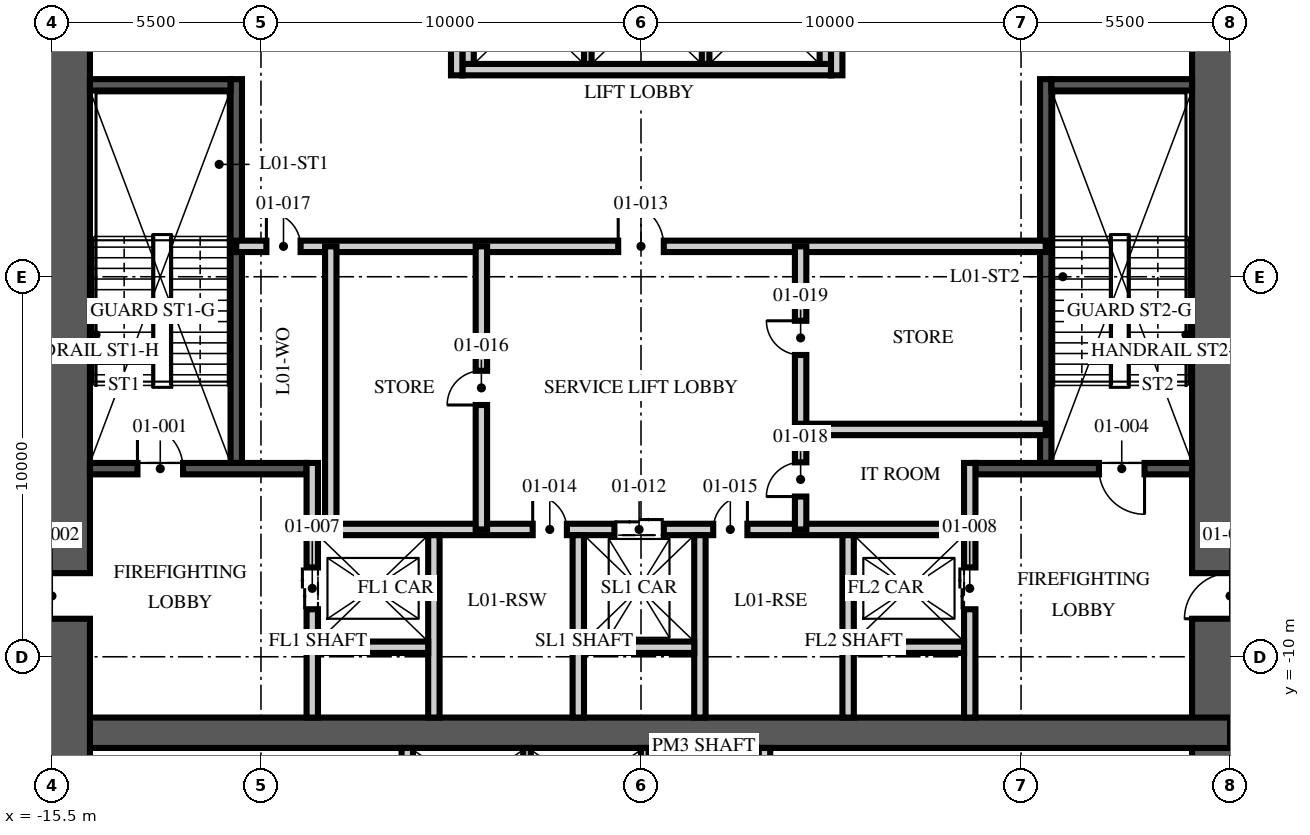
"""IFC4 building model, lengths in metres.
Left out: names, types, materials, properties, quantities, classifications, styles, units other than length and angle.
Written with IfcOpenShell. Run it as: python <this file> out.ifc"""

import sys

from ifc_helpers import new_model, si_unit, direction, frame, frame_2d, origin, place, context, subcontext, project, spatial, rectangle, extrude, element, fill, save


model = new_model("IFC4")
c1 = context("Model", 3, precision=1e-05, world=origin(), true_north=direction((0.0, 1.0)))
c2 = subcontext(c1, "Body", "Model", "MODEL_VIEW")
j1 = project(units=[si_unit("LENGTHUNIT", "METRE"), si_unit("PLANEANGLEUNIT", "RADIAN")], contexts=[c1])
p1 = place(None, origin())
s1 = spatial("IfcSite", under=j1, at=p1, CompositionType="ELEMENT")
p2 = place(p1, origin())
s2 = spatial("IfcBuilding", under=s1, at=p2, CompositionType="ELEMENT")
p3 = place(p2, frame((0.0, 0.0, 6.0)))
s3 = spatial("IfcBuildingStorey", under=s2, at=p3, CompositionType="ELEMENT", Elevation=6.0)
p4 = place(p3, frame((15.5, -15.5, -0.3), z_axis=(0.0, 0.0, 1.0), x_axis=(0.0, 1.0, 0.0)))
e1 = element("IfcWall", 1, at=p4, inside=s3, PredefinedType="SHEAR", context=c2, shape_type="SweptSolid", body=[
    extrude(rectangle(XDim=31.0, YDim=2.0, at=frame_2d((15.5, 0.0))), origin(), (0.0, 0.0, 1.0), 5.0),
])
p5 = place(p4, frame((6.5, 0.0, 0.3)))
e2 = element("IfcOpeningElement", 2, at=p5, cuts=e1, PredefinedType="OPENING", context=c2, shape_type="SweptSolid", body=[
    extrude(rectangle(XDim=1.2, YDim=2.1, at=frame_2d((0.6, 1.05))), frame((0.0, 1.01, 0.0), z_axis=(0.0, -1.0, 0.0), x_axis=(1.0, 0.0, 0.0)), (0.0, 0.0, 1.0), 2.02),
])
p6 = place(p4, frame((23.0, 0.0, 0.3)))
e3 = element("IfcOpeningElement", 3, at=p6, cuts=e1, PredefinedType="OPENING", context=c2, shape_type="SweptSolid", body=[
    extrude(rectangle(XDim=1.8, YDim=2.1, at=frame_2d((0.9, 1.05))), frame((0.0, 1.01, 0.0), z_axis=(0.0, -1.0, 0.0), x_axis=(1.0, 0.0, 0.0)), (0.0, 0.0, 1.0), 2.02),
])
p7 = place(p3, frame((-15.5, -12.0, -0.3), z_axis=(0.0, 0.0, 1.0), x_axis=(1.0, 0.0, 0.0)))
e4 = element("IfcWall", 4, at=p7, inside=s3, PredefinedType="SHEAR", context=c2, shape_type="SweptSolid", body=[
    extrude(rectangle(XDim=31.0, YDim=0.8, at=frame_2d((15.5, 0.0))), origin(), (0.0, 0.0, 1.0), 5.0),
])
p8 = place(p3, frame((-15.5, -15.5, -0.3), z_axis=(0.0, 0.0, 1.0), x_axis=(0.0, 1.0, 0.0)))
e5 = element("IfcWall", 5, at=p8, inside=s3, PredefinedType="SHEAR", context=c2, shape_type="SweptSolid", body=[
    extrude(rectangle(XDim=31.0, YDim=2.0, at=frame_2d((15.5, 0.0))), origin(), (0.0, 0.0, 1.0), 5.0),
])
p9 = place(p8, frame((6.5, 0.0, 0.3)))
e6 = element("IfcOpeningElement", 6, at=p9, cuts=e5, PredefinedType="OPENING", context=c2, shape_type="SweptSolid", body=[
    extrude(rectangle(XDim=1.2, YDim=2.1, at=frame_2d((0.6, 1.05))), frame((0.0, 1.01, 0.0), z_axis=(0.0, -1.0, 0.0), x_axis=(1.0, 0.0, 0.0)), (0.0, 0.0, 1.0), 2.02),
])
p10 = place(p8, frame((23.0, 0.0, 0.3)))
e7 = element("IfcOpeningElement", 7, at=p10, cuts=e5, PredefinedType="OPENING", context=c2, shape_type="SweptSolid", body=[
    extrude(rectangle(XDim=1.8, YDim=2.1, at=frame_2d((0.9, 1.05))), frame((0.0, 1.01, 0.0), z_axis=(0.0, -1.0, 0.0), x_axis=(1.0, 0.0, 0.0)), (0.0, 0.0, 1.0), 2.02),
])
p11 = place(p3, frame((-10.65, -4.9, 0.0), z_axis=(0.0, 0.0, 1.0), x_axis=(0.0, 1.0, 0.0)))
e8 = element("IfcWall", 8, at=p11, inside=s3, PredefinedType="SOLIDWALL", context=c2, shape_type="SweptSolid", body=[
    extrude(rectangle(XDim=10.1, YDim=0.3, at=frame_2d((5.05, 0.0))), origin(), (0.0, 0.0, 1.0), 4.7),
])
p12 = place(p3, frame((-14.5, -5.05, 0.0), z_axis=(0.0, 0.0, 1.0), x_axis=(1.0, 0.0, 0.0)))
e9 = element("IfcWall", 9, at=p12, inside=s3, PredefinedType="SOLIDWALL", context=c2, shape_type="SweptSolid", body=[
    extrude(rectangle(XDim=5.7, YDim=0.3, at=frame_2d((2.85, 0.0))), origin(), (0.0, 0.0, 1.0), 4.7),
])
p13 = place(p12, frame((1.25, 0.0, 0.0)))
e10 = element("IfcOpeningElement", 10, at=p13, cuts=e9, PredefinedType="OPENING", context=c2, shape_type="SweptSolid", body=[
    extrude(rectangle(XDim=1.2, YDim=2.1, at=frame_2d((0.6, 1.05))), frame((0.0, 0.16, 0.0), z_axis=(0.0, -1.0, 0.0), x_axis=(1.0, 0.0, 0.0)), (0.0, 0.0, 1.0), 0.32),
])
p14 = place(p3, frame((-14.5, 5.05, 0.0), z_axis=(0.0, 0.0, 1.0), x_axis=(1.0, 0.0, 0.0)))
e11 = element("IfcWall", 11, at=p14, inside=s3, PredefinedType="SOLIDWALL", context=c2, shape_type="SweptSolid", body=[
    extrude(rectangle(XDim=3.7, YDim=0.3, at=frame_2d((1.85, 0.0))), origin(), (0.0, 0.0, 1.0), 4.7),
])
p15 = place(p3, frame((-8.65, -11.6, 0.0), z_axis=(0.0, 0.0, 1.0), x_axis=(0.0, 1.0, 0.0)))
e12 = element("IfcWall", 12, at=p15, inside=s3, PredefinedType="PARTITIONING", context=c2, shape_type="SweptSolid", body=[
    extrude(rectangle(XDim=6.7, YDim=0.3, at=frame_2d((3.35, 0.0))), origin(), (0.0, 0.0, 1.0), 4.7),
])
p16 = place(p15, frame((2.85, 0.0, 0.0)))
e13 = element("IfcOpeningElement", 13, at=p16, cuts=e12, PredefinedType="OPENING", context=c2, shape_type="SweptSolid", body=[
    extrude(rectangle(XDim=1.1, YDim=2.1, at=frame_2d((0.55, 1.05))), frame((0.0, 0.16, 0.0), z_axis=(0.0, -1.0, 0.0), x_axis=(1.0, 0.0, 0.0)), (0.0, 0.0, 1.0), 0.32),
])
p17 = place(p3, frame((10.65, -4.9, 0.0), z_axis=(0.0, 0.0, 1.0), x_axis=(0.0, 1.0, 0.0)))
e14 = element("IfcWall", 14, at=p17, inside=s3, PredefinedType="SOLIDWALL", context=c2, shape_type="SweptSolid", body=[
    extrude(rectangle(XDim=10.1, YDim=0.3, at=frame_2d((5.05, 0.0))), origin(), (0.0, 0.0, 1.0), 4.7),
])
p18 = place(p3, frame((14.5, -5.05, 0.0), z_axis=(0.0, 0.0, 1.0), x_axis=(-1.0, 0.0, 0.0)))
e15 = element("IfcWall", 15, at=p18, inside=s3, PredefinedType="SOLIDWALL", context=c2, shape_type="SweptSolid", body=[
    extrude(rectangle(XDim=5.7, YDim=0.3, at=frame_2d((2.85, 0.0))), origin(), (0.0, 0.0, 1.0), 4.7),
])
p19 = place(p18, frame((1.25, 0.0, 0.0)))
e16 = element("IfcOpeningElement", 16, at=p19, cuts=e15, PredefinedType="OPENING", context=c2, shape_type="SweptSolid", body=[
    extrude(rectangle(XDim=1.2, YDim=2.1, at=frame_2d((0.6, 1.05))), frame((0.0, 0.16, 0.0), z_axis=(0.0, -1.0, 0.0), x_axis=(1.0, 0.0, 0.0)), (0.0, 0.0, 1.0), 0.32),
])
p20 = place(p3, frame((14.5, 5.05, 0.0), z_axis=(0.0, 0.0, 1.0), x_axis=(-1.0, 0.0, 0.0)))
e17 = element("IfcWall", 17, at=p20, inside=s3, PredefinedType="SOLIDWALL", context=c2, shape_type="SweptSolid", body=[
    extrude(rectangle(XDim=3.7, YDim=0.3, at=frame_2d((1.85, 0.0))), origin(), (0.0, 0.0, 1.0), 4.7),
])
p21 = place(p3, frame((8.65, -11.6, 0.0), z_axis=(0.0, 0.0, 1.0), x_axis=(0.0, 1.0, 0.0)))
e18 = element("IfcWall", 18, at=p21, inside=s3, PredefinedType="PARTITIONING", context=c2, shape_type="SweptSolid", body=[
    extrude(rectangle(XDim=6.7, YDim=0.3, at=frame_2d((3.35, 0.0))), origin(), (0.0, 0.0, 1.0), 4.7),
])
p22 = place(p21, frame((2.85, 0.0, 0.0)))
e19 = element("IfcOpeningElement", 19, at=p22, cuts=e18, PredefinedType="OPENING", context=c2, shape_type="SweptSolid", body=[
    extrude(rectangle(XDim=1.1, YDim=2.1, at=frame_2d((0.55, 1.05))), frame((0.0, 0.16, 0.0), z_axis=(0.0, -1.0, 0.0), x_axis=(1.0, 0.0, 0.0)), (0.0, 0.0, 1.0), 0.32),
])
p23 = place(p3, frame((-8.5, -6.65, 0.0), z_axis=(0.0, 0.0, 1.0), x_axis=(1.0, 0.0, 0.0)))
e20 = element("IfcWall", 20, at=p23, inside=s3, PredefinedType="PARTITIONING", context=c2, shape_type="SweptSolid", body=[
    extrude(rectangle(XDim=17.0, YDim=0.3, at=frame_2d((8.5, 0.0))), origin(), (0.0, 0.0, 1.0), 4.7),
])
p24 = place(p23, frame((7.8, 0.0, 0.0)))
e21 = element("IfcOpeningElement", 21, at=p24, cuts=e20, PredefinedType="OPENING", context=c2, shape_type="SweptSolid", body=[
    extrude(rectangle(XDim=1.3, YDim=2.4, at=frame_2d((0.65, 1.2))), frame((0.0, 0.16, 0.0), z_axis=(0.0, -1.0, 0.0), x_axis=(1.0, 0.0, 0.0)), (0.0, 0.0, 1.0), 0.32),
])
p25 = place(p23, frame((5.65, 0.0, 0.0)))
e22 = element("IfcOpeningElement", 22, at=p25, cuts=e20, PredefinedType="OPENING", context=c2, shape_type="SweptSolid", body=[
    extrude(rectangle(XDim=0.9, YDim=2.1, at=frame_2d((0.45, 1.05))), frame((0.0, 0.16, 0.0), z_axis=(0.0, -1.0, 0.0), x_axis=(1.0, 0.0, 0.0)), (0.0, 0.0, 1.0), 0.32),
])
p26 = place(p23, frame((10.4, 0.0, 0.0)))
e23 = element("IfcOpeningElement", 23, at=p26, cuts=e20, PredefinedType="OPENING", context=c2, shape_type="SweptSolid", body=[
    extrude(rectangle(XDim=0.9, YDim=2.1, at=frame_2d((0.45, 1.05))), frame((0.0, 0.16, 0.0), z_axis=(0.0, -1.0, 0.0), x_axis=(1.0, 0.0, 0.0)), (0.0, 0.0, 1.0), 0.32),
])
for number, where, z_axis, x_axis in (
    (24, (-5.45, -11.6, 0.0), (0.0, 0.0, 1.0), (0.0, 1.0, 0.0)),
    (25, (-1.65, -11.6, 0.0), (0.0, 0.0, 1.0), (0.0, 1.0, 0.0)),
    (26, (1.55, -11.6, 0.0), (0.0, 0.0, 1.0), (0.0, 1.0, 0.0)),
    (27, (5.45, -11.6, 0.0), (0.0, 0.0, 1.0), (0.0, 1.0, 0.0)),
):
    element("IfcWall", number, at=place(p3, frame(where, z_axis=z_axis, x_axis=x_axis)), inside=s3, PredefinedType="PARTITIONING", context=c2, shape_type="SweptSolid", body=[
        extrude(rectangle(XDim=4.8, YDim=0.3, at=frame_2d((2.4, 0.0))), origin(), (0.0, 0.0, 1.0), 4.7),
    ])
for number, where, z_axis, x_axis in (
    (28, (-8.5, -9.75, 0.0), (0.0, 0.0, 1.0), (1.0, 0.0, 0.0)),
    (29, (-1.5, -9.75, 0.0), (0.0, 0.0, 1.0), (1.0, 0.0, 0.0)),
    (30, (5.6, -9.75, 0.0), (0.0, 0.0, 1.0), (1.0, 0.0, 0.0)),
):
    element("IfcWall", number, at=place(p3, frame(where, z_axis=z_axis, x_axis=x_axis)), inside=s3, PredefinedType="PARTITIONING", context=c2, shape_type="SweptSolid", body=[
        extrude(rectangle(XDim=2.9, YDim=0.3, at=frame_2d((1.45, 0.0))), origin(), (0.0, 0.0, 1.0), 4.7),
    ])
p27 = place(p3, frame((-4.7, 5.45, 0.0), z_axis=(0.0, 0.0, 1.0), x_axis=(1.0, 0.0, 0.0)))
e31 = element("IfcWall", 31, at=p27, inside=s3, PredefinedType="PARTITIONING", context=c2, shape_type="SweptSolid", body=[
    extrude(rectangle(XDim=9.7, YDim=0.3, at=frame_2d((4.85, 0.0))), origin(), (0.0, 0.0, 1.0), 4.7),
])
for number, where, z_axis, x_axis in (
    (32, (-4.55, 5.6, 0.0), (0.0, 0.0, 1.0), (0.0, 1.0, 0.0)),
    (33, (4.85, 5.6, 0.0), (0.0, 0.0, 1.0), (0.0, 1.0, 0.0)),
):
    element("IfcWall", number, at=place(p3, frame(where, z_axis=z_axis, x_axis=x_axis)), inside=s3, PredefinedType="PARTITIONING", context=c2, shape_type="SweptSolid", body=[
        extrude(rectangle(XDim=2.8, YDim=0.3, at=frame_2d((1.4, 0.0))), origin(), (0.0, 0.0, 1.0), 4.7),
    ])
for number, where, z_axis, x_axis in (
    (34, (-1.4, 5.6, 0.0), (0.0, 0.0, 1.0), (0.0, 1.0, 0.0)),
    (35, (1.7, 5.6, 0.0), (0.0, 0.0, 1.0), (0.0, 1.0, 0.0)),
):
    element("IfcWall", number, at=place(p3, frame(where, z_axis=z_axis, x_axis=x_axis)), inside=s3, PredefinedType="PARTITIONING", context=c2, shape_type="SweptSolid", body=[
        extrude(rectangle(XDim=2.8, YDim=0.2, at=frame_2d((1.4, 0.0))), origin(), (0.0, 0.0, 1.0), 4.7),
    ])
for number, where, z_axis, x_axis in (
    (36, (-6.15, -14.5, 0.0), (0.0, 0.0, 1.0), (0.0, 1.0, 0.0)),
    (37, (3.25, -14.5, 0.0), (0.0, 0.0, 1.0), (0.0, 1.0, 0.0)),
):
    element("IfcWall", number, at=place(p3, frame(where, z_axis=z_axis, x_axis=x_axis)), inside=s3, PredefinedType="PARTITIONING", context=c2, shape_type="SweptSolid", body=[
        extrude(rectangle(XDim=2.1, YDim=0.3, at=frame_2d((1.05, 0.0))), origin(), (0.0, 0.0, 1.0), 4.7),
    ])
for number, where, z_axis, x_axis in (
    (38, (-3.0, -14.5, 0.0), (0.0, 0.0, 1.0), (0.0, 1.0, 0.0)),
    (39, (0.1, -14.5, 0.0), (0.0, 0.0, 1.0), (0.0, 1.0, 0.0)),
):
    element("IfcWall", number, at=place(p3, frame(where, z_axis=z_axis, x_axis=x_axis)), inside=s3, PredefinedType="PARTITIONING", context=c2, shape_type="SweptSolid", body=[
        extrude(rectangle(XDim=2.1, YDim=0.2, at=frame_2d((1.05, 0.0))), origin(), (0.0, 0.0, 1.0), 4.7),
    ])
p28 = place(p3, frame((-10.65, 0.8, 0.0), z_axis=(0.0, 0.0, 1.0), x_axis=(1.0, 0.0, 0.0)))
e40 = element("IfcWall", 40, at=p28, inside=s3, PredefinedType="PARTITIONING", context=c2, shape_type="SweptSolid", body=[
    extrude(rectangle(XDim=21.3, YDim=0.3, at=frame_2d((10.65, 0.0))), origin(), (0.0, 0.0, 1.0), 4.7),
])
p29 = place(p28, frame((10.05, 0.0, 0.0)))
e41 = element("IfcOpeningElement", 41, at=p29, cuts=e40, PredefinedType="OPENING", context=c2, shape_type="SweptSolid", body=[
    extrude(rectangle(XDim=1.2, YDim=2.1, at=frame_2d((0.6, 1.05))), frame((0.0, 0.16, 0.0), z_axis=(0.0, -1.0, 0.0), x_axis=(1.0, 0.0, 0.0)), (0.0, 0.0, 1.0), 0.32),
])
p30 = place(p28, frame((0.793, 0.0, 0.0)))
e42 = element("IfcOpeningElement", 42, at=p30, cuts=e40, PredefinedType="OPENING", context=c2, shape_type="SweptSolid", body=[
    extrude(rectangle(XDim=0.9, YDim=2.1, at=frame_2d((0.45, 1.05))), frame((0.0, 0.16, 0.0), z_axis=(0.0, -1.0, 0.0), x_axis=(1.0, 0.0, 0.0)), (0.0, 0.0, 1.0), 0.32),
])
p31 = place(p3, frame((-4.2, -6.65, 0.0), z_axis=(0.0, 0.0, 1.0), x_axis=(0.0, 1.0, 0.0)))
e43 = element("IfcWall", 43, at=p31, inside=s3, PredefinedType="PARTITIONING", context=c2, shape_type="SweptSolid", body=[
    extrude(rectangle(XDim=7.45, YDim=0.3, at=frame_2d((3.725, 0.0))), origin(), (0.0, 0.0, 1.0), 4.7),
])
p32 = place(p31, frame((3.275, 0.0, 0.0)))
e44 = element("IfcOpeningElement", 44, at=p32, cuts=e43, PredefinedType="OPENING", context=c2, shape_type="SweptSolid", body=[
    extrude(rectangle(XDim=0.9, YDim=2.1, at=frame_2d((0.45, 1.05))), frame((0.0, 0.16, 0.0), z_axis=(0.0, -1.0, 0.0), x_axis=(1.0, 0.0, 0.0)), (0.0, 0.0, 1.0), 0.32),
])
p33 = place(p3, frame((4.2, -6.65, 0.0), z_axis=(0.0, 0.0, 1.0), x_axis=(0.0, 1.0, 0.0)))
e45 = element("IfcWall", 45, at=p33, inside=s3, PredefinedType="PARTITIONING", context=c2, shape_type="SweptSolid", body=[
    extrude(rectangle(XDim=7.45, YDim=0.3, at=frame_2d((3.725, 0.0))), origin(), (0.0, 0.0, 1.0), 4.7),
])
p34 = place(p33, frame((0.866, 0.0, 0.0)))
e46 = element("IfcOpeningElement", 46, at=p34, cuts=e45, PredefinedType="OPENING", context=c2, shape_type="SweptSolid", body=[
    extrude(rectangle(XDim=0.9, YDim=2.1, at=frame_2d((0.45, 1.05))), frame((0.0, 0.16, 0.0), z_axis=(0.0, -1.0, 0.0), x_axis=(1.0, 0.0, 0.0)), (0.0, 0.0, 1.0), 0.32),
])
p35 = place(p33, frame((4.591, 0.0, 0.0)))
e47 = element("IfcOpeningElement", 47, at=p35, cuts=e45, PredefinedType="OPENING", context=c2, shape_type="SweptSolid", body=[
    extrude(rectangle(XDim=0.9, YDim=2.1, at=frame_2d((0.45, 1.05))), frame((0.0, 0.16, 0.0), z_axis=(0.0, -1.0, 0.0), x_axis=(1.0, 0.0, 0.0)), (0.0, 0.0, 1.0), 0.32),
])
p36 = place(p3, frame((-8.163, -6.65, 0.0), z_axis=(0.0, 0.0, 1.0), x_axis=(0.0, 1.0, 0.0)))
e48 = element("IfcWall", 48, at=p36, inside=s3, PredefinedType="PARTITIONING", context=c2, shape_type="SweptSolid", body=[
    extrude(rectangle(XDim=7.45, YDim=0.3, at=frame_2d((3.725, 0.0))), origin(), (0.0, 0.0, 1.0), 4.7),
])
p37 = place(p3, frame((10.65, -4.018, 0.0), z_axis=(0.0, 0.0, 1.0), x_axis=(-1.0, 0.0, 0.0)))
e49 = element("IfcWall", 49, at=p37, inside=s3, PredefinedType="PARTITIONING", context=c2, shape_type="SweptSolid", body=[
    extrude(rectangle(XDim=6.45, YDim=0.3, at=frame_2d((3.225, 0.0))), origin(), (0.0, 0.0, 1.0), 4.7),
])
p38 = place(p3, frame((-4.85, 5.3, 0.0), z_axis=(0.0, 0.0, 1.0), x_axis=(0.0, 1.0, 0.0)))
e50 = element("IfcWall", 50, at=p38, inside=s3, PredefinedType="PARTITIONING", context=c2, shape_type="SweptSolid", body=[
    extrude(rectangle(XDim=6.3, YDim=0.3, at=frame_2d((3.15, 0.0))), origin(), (0.0, 0.0, 1.0), 4.7),
])
p39 = place(p38, frame((4.35, 0.0, 0.0)))
e51 = element("IfcOpeningElement", 51, at=p39, cuts=e50, PredefinedType="OPENING", context=c2, shape_type="SweptSolid", body=[
    extrude(rectangle(XDim=0.9, YDim=2.1, at=frame_2d((0.45, 1.05))), frame((0.0, 0.16, 0.0), z_axis=(0.0, -1.0, 0.0), x_axis=(1.0, 0.0, 0.0)), (0.0, 0.0, 1.0), 0.32),
])
p40 = place(p3, frame((5.15, 5.3, 0.0), z_axis=(0.0, 0.0, 1.0), x_axis=(0.0, 1.0, 0.0)))
e52 = element("IfcWall", 52, at=p40, inside=s3, PredefinedType="PARTITIONING", context=c2, shape_type="SweptSolid", body=[
    extrude(rectangle(XDim=6.3, YDim=0.3, at=frame_2d((3.15, 0.0))), origin(), (0.0, 0.0, 1.0), 4.7),
])
p41 = place(p40, frame((4.35, 0.0, 0.0)))
e53 = element("IfcOpeningElement", 53, at=p41, cuts=e52, PredefinedType="OPENING", context=c2, shape_type="SweptSolid", body=[
    extrude(rectangle(XDim=0.9, YDim=2.1, at=frame_2d((0.45, 1.05))), frame((0.0, 0.16, 0.0), z_axis=(0.0, -1.0, 0.0), x_axis=(1.0, 0.0, 0.0)), (0.0, 0.0, 1.0), 0.32),
])
p42 = place(p13, origin())
e54 = element("IfcDoor", 54, at=p42, inside=s3, OperationType="SINGLE_SWING_LEFT", PredefinedType="DOOR", context=c2, shape_type="SweptSolid", body=[
    extrude(rectangle(XDim=1.2, YDim=2.1, at=frame_2d((0.6, 1.05))), frame((0.0, 0.025, 0.0), z_axis=(0.0, -1.0, 0.0), x_axis=(1.0, 0.0, 0.0)), (0.0, 0.0, 1.0), 0.05),
])
fill(e10, e54)
p43 = place(p9, origin())
e55 = element("IfcDoor", 55, at=p43, inside=s3, OperationType="SINGLE_SWING_LEFT", PredefinedType="DOOR", context=c2, shape_type="SweptSolid", body=[
    extrude(rectangle(XDim=1.2, YDim=2.1, at=frame_2d((0.6, 1.05))), frame((0.0, 0.025, 0.0), z_axis=(0.0, -1.0, 0.0), x_axis=(1.0, 0.0, 0.0)), (0.0, 0.0, 1.0), 0.05),
])
fill(e6, e55)
p44 = place(p19, origin())
e56 = element("IfcDoor", 56, at=p44, inside=s3, OperationType="SINGLE_SWING_LEFT", PredefinedType="DOOR", context=c2, shape_type="SweptSolid", body=[
    extrude(rectangle(XDim=1.2, YDim=2.1, at=frame_2d((0.6, 1.05))), frame((0.0, 0.025, 0.0), z_axis=(0.0, -1.0, 0.0), x_axis=(1.0, 0.0, 0.0)), (0.0, 0.0, 1.0), 0.05),
])
fill(e16, e56)
p45 = place(p5, origin())
e57 = element("IfcDoor", 57, at=p45, inside=s3, OperationType="SINGLE_SWING_LEFT", PredefinedType="DOOR", context=c2, shape_type="SweptSolid", body=[
    extrude(rectangle(XDim=1.2, YDim=2.1, at=frame_2d((0.6, 1.05))), frame((0.0, 0.025, 0.0), z_axis=(0.0, -1.0, 0.0), x_axis=(1.0, 0.0, 0.0)), (0.0, 0.0, 1.0), 0.05),
])
fill(e2, e57)
p46 = place(p16, origin())
e58 = element("IfcDoor", 58, at=p46, inside=s3, OperationType="DOUBLE_DOOR_SLIDING", PredefinedType="DOOR", context=c2, shape_type="SweptSolid", body=[
    extrude(rectangle(XDim=1.1, YDim=2.1, at=frame_2d((0.55, 1.05))), frame((0.0, 0.025, 0.0), z_axis=(0.0, -1.0, 0.0), x_axis=(1.0, 0.0, 0.0)), (0.0, 0.0, 1.0), 0.05),
])
fill(e13, e58)
p47 = place(p22, origin())
e59 = element("IfcDoor", 59, at=p47, inside=s3, OperationType="DOUBLE_DOOR_SLIDING", PredefinedType="DOOR", context=c2, shape_type="SweptSolid", body=[
    extrude(rectangle(XDim=1.1, YDim=2.1, at=frame_2d((0.55, 1.05))), frame((0.0, 0.025, 0.0), z_axis=(0.0, -1.0, 0.0), x_axis=(1.0, 0.0, 0.0)), (0.0, 0.0, 1.0), 0.05),
])
fill(e19, e59)
p48 = place(p24, origin())
e60 = element("IfcDoor", 60, at=p48, inside=s3, OperationType="DOUBLE_DOOR_SLIDING", PredefinedType="DOOR", context=c2, shape_type="SweptSolid", body=[
    extrude(rectangle(XDim=1.3, YDim=2.4, at=frame_2d((0.65, 1.2))), frame((0.0, 0.025, 0.0), z_axis=(0.0, -1.0, 0.0), x_axis=(1.0, 0.0, 0.0)), (0.0, 0.0, 1.0), 0.05),
])
fill(e21, e60)
p49 = place(p29, origin())
e61 = element("IfcDoor", 61, at=p49, inside=s3, OperationType="SINGLE_SWING_LEFT", PredefinedType="DOOR", context=c2, shape_type="SweptSolid", body=[
    extrude(rectangle(XDim=1.2, YDim=2.1, at=frame_2d((0.6, 1.05))), frame((0.0, 0.025, 0.0), z_axis=(0.0, -1.0, 0.0), x_axis=(1.0, 0.0, 0.0)), (0.0, 0.0, 1.0), 0.05),
])
fill(e41, e61)
p50 = place(p25, origin())
e62 = element("IfcDoor", 62, at=p50, inside=s3, OperationType="SINGLE_SWING_LEFT", PredefinedType="DOOR", context=c2, shape_type="SweptSolid", body=[
    extrude(rectangle(XDim=0.9, YDim=2.1, at=frame_2d((0.45, 1.05))), frame((0.0, 0.025, 0.0), z_axis=(0.0, -1.0, 0.0), x_axis=(1.0, 0.0, 0.0)), (0.0, 0.0, 1.0), 0.05),
])
fill(e22, e62)
p51 = place(p26, origin())
e63 = element("IfcDoor", 63, at=p51, inside=s3, OperationType="SINGLE_SWING_RIGHT", PredefinedType="DOOR", context=c2, shape_type="SweptSolid", body=[
    extrude(rectangle(XDim=0.9, YDim=2.1, at=frame_2d((0.45, 1.05))), frame((0.0, 0.025, 0.0), z_axis=(0.0, -1.0, 0.0), x_axis=(1.0, 0.0, 0.0)), (0.0, 0.0, 1.0), 0.05),
])
fill(e23, e63)
p52 = place(p32, origin())
e64 = element("IfcDoor", 64, at=p52, inside=s3, OperationType="SINGLE_SWING_LEFT", PredefinedType="DOOR", context=c2, shape_type="SweptSolid", body=[
    extrude(rectangle(XDim=0.9, YDim=2.1, at=frame_2d((0.45, 1.05))), frame((0.0, 0.025, 0.0), z_axis=(0.0, -1.0, 0.0), x_axis=(1.0, 0.0, 0.0)), (0.0, 0.0, 1.0), 0.05),
])
fill(e44, e64)
p53 = place(p30, origin())
e65 = element("IfcDoor", 65, at=p53, inside=s3, OperationType="SINGLE_SWING_LEFT", PredefinedType="DOOR", context=c2, shape_type="SweptSolid", body=[
    extrude(rectangle(XDim=0.9, YDim=2.1, at=frame_2d((0.45, 1.05))), frame((0.0, 0.025, 0.0), z_axis=(0.0, -1.0, 0.0), x_axis=(1.0, 0.0, 0.0)), (0.0, 0.0, 1.0), 0.05),
])
fill(e42, e65)
p54 = place(p34, origin())
e66 = element("IfcDoor", 66, at=p54, inside=s3, OperationType="SINGLE_SWING_LEFT", PredefinedType="DOOR", context=c2, shape_type="SweptSolid", body=[
    extrude(rectangle(XDim=0.9, YDim=2.1, at=frame_2d((0.45, 1.05))), frame((0.0, 0.025, 0.0), z_axis=(0.0, -1.0, 0.0), x_axis=(1.0, 0.0, 0.0)), (0.0, 0.0, 1.0), 0.05),
])
fill(e46, e66)
p55 = place(p35, origin())
e67 = element("IfcDoor", 67, at=p55, inside=s3, OperationType="SINGLE_SWING_RIGHT", PredefinedType="DOOR", context=c2, shape_type="SweptSolid", body=[
    extrude(rectangle(XDim=0.9, YDim=2.1, at=frame_2d((0.45, 1.05))), frame((0.0, 0.025, 0.0), z_axis=(0.0, -1.0, 0.0), x_axis=(1.0, 0.0, 0.0)), (0.0, 0.0, 1.0), 0.05),
])
fill(e47, e67)
save(model, sys.argv[1])
